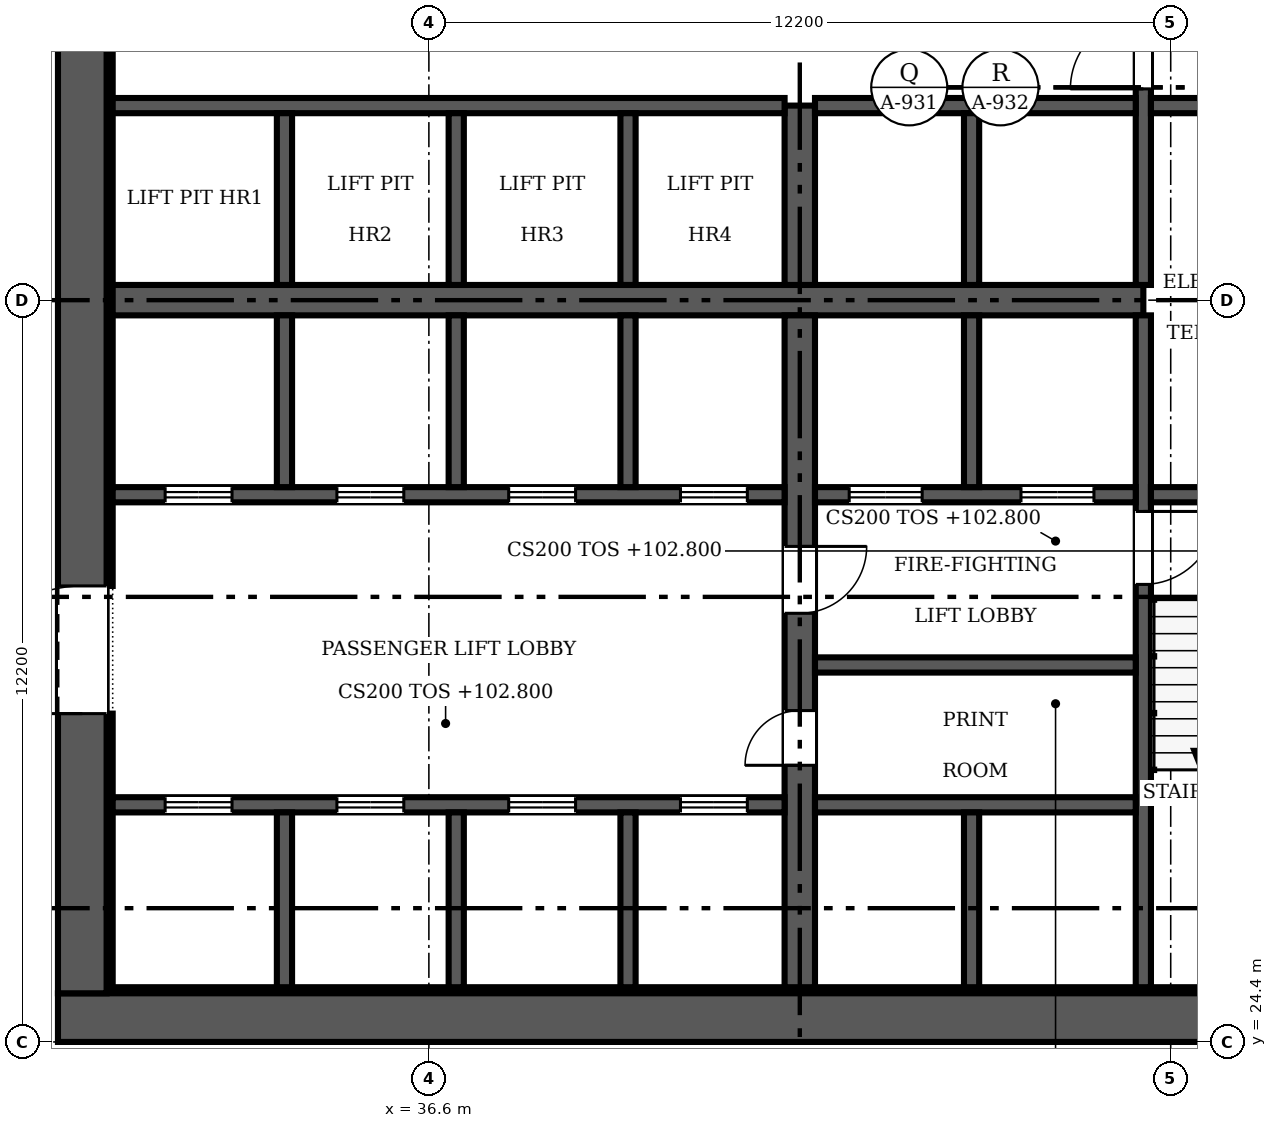
"""IFC4 building model, lengths in metres.
Left out: names, types, materials, properties, quantities, classifications, styles, units other than length and angle.
Written with IfcOpenShell. Run it as: python <this file> out.ifc"""

import sys

from ifc_helpers import new_model, si_unit, direction, frame, frame_2d, origin, place, context, subcontext, project, spatial, rectangle, extrude, source, transform, mapped, element, fill, save


model = new_model("IFC4")
c1 = context("Model", 3, precision=1e-05, world=origin(), true_north=direction((0.0, 1.0)))
c2 = subcontext(c1, "Body", "Model", "MODEL_VIEW")
j1 = project(units=[si_unit("LENGTHUNIT", "METRE"), si_unit("PLANEANGLEUNIT", "RADIAN")], contexts=[c1])
p1 = place(None, origin())
s1 = spatial("IfcSite", under=j1, at=p1, CompositionType="ELEMENT")
p2 = place(p1, origin())
s2 = spatial("IfcBuilding", under=s1, at=p2, CompositionType="ELEMENT")
p3 = place(p2, frame((0.0, 0.0, 102.8)))
s3 = spatial("IfcBuildingStorey", under=s2, at=p3, CompositionType="ELEMENT", Elevation=102.8)
p4 = place(p3, frame((54.9, 24.8, 0.0), z_axis=(0.0, 0.0, 1.0), x_axis=(-1.0, 0.0, 0.0)))
e1 = element("IfcWall", 1, at=p4, inside=s3, PredefinedType="SHEAR", context=c2, shape_type="SweptSolid", body=[
    extrude(rectangle(XDim=24.4, YDim=0.8, at=frame_2d((12.2, 0.0))), origin(), (0.0, 0.0, 1.0), 3.8),
])
m1 = source(origin(), c2, "Body", "SweptSolid", [
    extrude(rectangle(XDim=1.2, YDim=2.1, at=frame_2d((0.6, 1.05))), frame((0.0, 0.41, 0.0), z_axis=(0.0, -1.0, 0.0), x_axis=(1.0, 0.0, 0.0)), (0.0, 0.0, 1.0), 0.82),
])
p5 = place(p4, frame((1.5, 0.0, 0.0)))
e2 = element("IfcOpeningElement", 2, at=p5, cuts=e1, PredefinedType="OPENING", context=c2, shape_type="MappedRepresentation", body=[
    mapped(m1, transform((0.0, 0.0, 0.0), scale=1.0)),
])
p6 = place(p3, frame((30.9, 25.2, 0.0), z_axis=(0.0, 0.0, 1.0), x_axis=(0.0, 1.0, 0.0)))
e3 = element("IfcWall", 3, at=p6, inside=s3, PredefinedType="SHEAR", context=c2, shape_type="SweptSolid", body=[
    extrude(rectangle(XDim=22.8, YDim=0.8, at=frame_2d((11.4, 0.0))), origin(), (0.0, 0.0, 1.0), 3.8),
])
m2 = source(origin(), c2, "Body", "SweptSolid", [
    extrude(rectangle(XDim=2.1, YDim=2.4, at=frame_2d((1.05, 1.2))), frame((0.0, 0.41, 0.0), z_axis=(0.0, -1.0, 0.0), x_axis=(1.0, 0.0, 0.0)), (0.0, 0.0, 1.0), 0.82),
])
p7 = place(p6, frame((4.6, 0.0, 0.0)))
e4 = element("IfcOpeningElement", 4, at=p7, cuts=e3, PredefinedType="OPENING", context=c2, shape_type="MappedRepresentation", body=[
    mapped(m2, transform((0.0, 0.0, 0.0), scale=1.0)),
])
p8 = place(p6, frame((16.1, 0.0, 0.0)))
e5 = element("IfcOpeningElement", 5, at=p8, cuts=e3, PredefinedType="OPENING", context=c2, shape_type="MappedRepresentation", body=[
    mapped(m2, transform((0.0, 0.0, 0.0), scale=1.0)),
])
p9 = place(p3, frame((31.3, 25.25, 0.0), z_axis=(0.0, 0.0, 1.0), x_axis=(1.0, 0.0, 0.0)))
e6 = element("IfcWall", 6, at=p9, inside=s3, PredefinedType="SOLIDWALL", context=c2, shape_type="SweptSolid", body=[
    extrude(rectangle(XDim=20.9, YDim=0.1, at=frame_2d((10.45, 0.0))), origin(), (0.0, 0.0, 1.0), 3.8),
])
p10 = place(p3, frame((31.35, 25.3, 0.0), z_axis=(0.0, 0.0, 1.0), x_axis=(0.0, 1.0, 0.0)))
e7 = element("IfcWall", 7, at=p10, inside=s3, PredefinedType="SOLIDWALL", context=c2, shape_type="SweptSolid", body=[
    extrude(rectangle(XDim=4.5, YDim=0.1, at=frame_2d((2.25, 0.0))), origin(), (0.0, 0.0, 1.0), 3.8),
])
p11 = place(p3, frame((31.35, 31.9, 0.0), z_axis=(0.0, 0.0, 1.0), x_axis=(0.0, 1.0, 0.0)))
e8 = element("IfcWall", 8, at=p11, inside=s3, PredefinedType="SOLIDWALL", context=c2, shape_type="SweptSolid", body=[
    extrude(rectangle(XDim=9.4, YDim=0.1, at=frame_2d((4.7, 0.0))), origin(), (0.0, 0.0, 1.0), 3.8),
])
p12 = place(p3, frame((31.4, 36.6, 0.0), z_axis=(0.0, 0.0, 1.0), x_axis=(1.0, 0.0, 0.0)))
e9 = element("IfcWall", 9, at=p12, inside=s3, PredefinedType="SHEAR", context=c2, shape_type="SweptSolid", body=[
    extrude(rectangle(XDim=16.95, YDim=0.5, at=frame_2d((8.475, 0.0))), origin(), (0.0, 0.0, 1.0), 3.8),
])
p13 = place(p3, frame((42.7, 36.35, 0.0), z_axis=(0.0, 0.0, 1.0), x_axis=(0.0, -1.0, 0.0)))
e10 = element("IfcWall", 10, at=p13, inside=s3, PredefinedType="SHEAR", context=c2, shape_type="SweptSolid", body=[
    extrude(rectangle(XDim=11.05, YDim=0.5, at=frame_2d((5.525, 0.0))), origin(), (0.0, 0.0, 1.0), 3.8),
])
m3 = source(origin(), c2, "Body", "SweptSolid", [
    extrude(rectangle(XDim=0.9, YDim=2.1, at=frame_2d((0.45, 1.05))), frame((0.0, 0.26, 0.0), z_axis=(0.0, -1.0, 0.0), x_axis=(1.0, 0.0, 0.0)), (0.0, 0.0, 1.0), 0.52),
])
p14 = place(p13, frame((6.5, 0.0, 0.0)))
e11 = element("IfcOpeningElement", 11, at=p14, cuts=e10, PredefinedType="OPENING", context=c2, shape_type="MappedRepresentation", body=[
    mapped(m3, transform((0.0, 0.0, 0.0), scale=1.0)),
])
m4 = source(origin(), c2, "Body", "SweptSolid", [
    extrude(rectangle(XDim=1.1, YDim=2.1, at=frame_2d((0.55, 1.05))), frame((0.0, 0.26, 0.0), z_axis=(0.0, -1.0, 0.0), x_axis=(1.0, 0.0, 0.0)), (0.0, 0.0, 1.0), 0.52),
])
p15 = place(p13, frame((3.8, 0.0, 0.0)))
e12 = element("IfcOpeningElement", 12, at=p15, cuts=e10, PredefinedType="OPENING", context=c2, shape_type="MappedRepresentation", body=[
    mapped(m4, transform((0.0, 0.0, 0.0), scale=1.0)),
])
p16 = place(p3, frame((42.7, 36.85, 0.0), z_axis=(0.0, 0.0, 1.0), x_axis=(0.0, 1.0, 0.0)))
e13 = element("IfcWall", 13, at=p16, inside=s3, PredefinedType="SHEAR", context=c2, shape_type="SweptSolid", body=[
    extrude(rectangle(XDim=2.95, YDim=0.5, at=frame_2d((1.475, 0.0))), origin(), (0.0, 0.0, 1.0), 3.8),
])
p17 = place(p3, frame((48.35, 36.35, 0.0), z_axis=(0.0, 0.0, 1.0), x_axis=(0.0, -1.0, 0.0)))
e14 = element("IfcWall", 14, at=p17, inside=s3, PredefinedType="SOLIDWALL", context=c2, shape_type="SweptSolid", body=[
    extrude(rectangle(XDim=11.05, YDim=0.25, at=frame_2d((5.525, 0.0))), origin(), (0.0, 0.0, 1.0), 3.8),
])
m5 = source(origin(), c2, "Body", "SweptSolid", [
    extrude(rectangle(XDim=1.2, YDim=2.1, at=frame_2d((0.6, 1.05))), frame((0.0, 0.135, 0.0), z_axis=(0.0, -1.0, 0.0), x_axis=(1.0, 0.0, 0.0)), (0.0, 0.0, 1.0), 0.27),
])
p18 = place(p17, frame((3.225, 0.0, 0.0)))
e15 = element("IfcOpeningElement", 15, at=p18, cuts=e14, PredefinedType="OPENING", context=c2, shape_type="MappedRepresentation", body=[
    mapped(m5, transform((0.0, 0.0, 0.0), scale=1.0)),
])
p19 = place(p3, frame((48.35, 47.9, 0.0), z_axis=(0.0, 0.0, 1.0), x_axis=(0.0, -1.0, 0.0)))
e16 = element("IfcWall", 16, at=p19, inside=s3, PredefinedType="SOLIDWALL", context=c2, shape_type="SweptSolid", body=[
    extrude(rectangle(XDim=11.05, YDim=0.25, at=frame_2d((5.525, 0.0))), origin(), (0.0, 0.0, 1.0), 3.8),
])
p20 = place(p19, frame((6.625, 0.0, 0.0)))
e17 = element("IfcOpeningElement", 17, at=p20, cuts=e16, PredefinedType="OPENING", context=c2, shape_type="MappedRepresentation", body=[
    mapped(m5, transform((0.0, 0.0, 0.0), scale=1.0)),
])
p21 = place(p3, frame((42.45, 33.4, 0.0), z_axis=(0.0, 0.0, 1.0), x_axis=(-1.0, 0.0, 0.0)))
e18 = element("IfcWall", 18, at=p21, inside=s3, PredefinedType="SOLIDWALL", context=c2, shape_type="SweptSolid", body=[
    extrude(rectangle(XDim=11.05, YDim=0.25, at=frame_2d((5.525, 0.0))), origin(), (0.0, 0.0, 1.0), 3.8),
])
m6 = source(origin(), c2, "Body", "SweptSolid", [
    extrude(rectangle(XDim=1.1, YDim=2.1, at=frame_2d((0.55, 1.05))), frame((0.0, 0.135, 0.0), z_axis=(0.0, -1.0, 0.0), x_axis=(1.0, 0.0, 0.0)), (0.0, 0.0, 1.0), 0.27),
])
p22 = place(p21, frame((9.087, 0.0, 0.0)))
e19 = element("IfcOpeningElement", 19, at=p22, cuts=e18, PredefinedType="OPENING", context=c2, shape_type="MappedRepresentation", body=[
    mapped(m6, transform((0.0, 0.0, 0.0), scale=1.0)),
])
p23 = place(p21, frame((6.262, 0.0, 0.0)))
e20 = element("IfcOpeningElement", 20, at=p23, cuts=e18, PredefinedType="OPENING", context=c2, shape_type="MappedRepresentation", body=[
    mapped(m6, transform((0.0, 0.0, 0.0), scale=1.0)),
])
p24 = place(p21, frame((3.438, 0.0, 0.0)))
e21 = element("IfcOpeningElement", 21, at=p24, cuts=e18, PredefinedType="OPENING", context=c2, shape_type="MappedRepresentation", body=[
    mapped(m6, transform((0.0, 0.0, 0.0), scale=1.0)),
])
p25 = place(p21, frame((0.613, 0.0, 0.0)))
e22 = element("IfcOpeningElement", 22, at=p25, cuts=e18, PredefinedType="OPENING", context=c2, shape_type="MappedRepresentation", body=[
    mapped(m6, transform((0.0, 0.0, 0.0), scale=1.0)),
])
p26 = place(p3, frame((48.225, 33.4, 0.0), z_axis=(0.0, 0.0, 1.0), x_axis=(-1.0, 0.0, 0.0)))
e23 = element("IfcWall", 23, at=p26, inside=s3, PredefinedType="SOLIDWALL", context=c2, shape_type="SweptSolid", body=[
    extrude(rectangle(XDim=5.275, YDim=0.25, at=frame_2d((2.638, 0.0))), origin(), (0.0, 0.0, 1.0), 3.8),
])
p27 = place(p26, frame((3.512, 0.0, 0.0)))
e24 = element("IfcOpeningElement", 24, at=p27, cuts=e23, PredefinedType="OPENING", context=c2, shape_type="MappedRepresentation", body=[
    mapped(m5, transform((0.0, 0.0, 0.0), scale=1.0)),
])
p28 = place(p26, frame((0.688, 0.0, 0.0)))
e25 = element("IfcOpeningElement", 25, at=p28, cuts=e23, PredefinedType="OPENING", context=c2, shape_type="MappedRepresentation", body=[
    mapped(m5, transform((0.0, 0.0, 0.0), scale=1.0)),
])
p29 = place(p3, frame((48.475, 33.4, 0.0), z_axis=(0.0, 0.0, 1.0), x_axis=(1.0, 0.0, 0.0)))
e26 = element("IfcWall", 26, at=p29, inside=s3, PredefinedType="SOLIDWALL", context=c2, shape_type="SweptSolid", body=[
    extrude(rectangle(XDim=3.525, YDim=0.25, at=frame_2d((1.762, 0.0))), origin(), (0.0, 0.0, 1.0), 3.8),
])
p30 = place(p3, frame((31.4, 39.8, 0.0), z_axis=(0.0, 0.0, 1.0), x_axis=(1.0, 0.0, 0.0)))
e27 = element("IfcWall", 27, at=p30, inside=s3, PredefinedType="SOLIDWALL", context=c2, shape_type="SweptSolid", body=[
    extrude(rectangle(XDim=11.05, YDim=0.25, at=frame_2d((5.525, 0.0))), origin(), (0.0, 0.0, 1.0), 3.8),
])
p31 = place(p3, frame((42.95, 39.8, 0.0), z_axis=(0.0, 0.0, 1.0), x_axis=(1.0, 0.0, 0.0)))
e28 = element("IfcWall", 28, at=p31, inside=s3, PredefinedType="SOLIDWALL", context=c2, shape_type="SweptSolid", body=[
    extrude(rectangle(XDim=5.275, YDim=0.25, at=frame_2d((2.638, 0.0))), origin(), (0.0, 0.0, 1.0), 3.8),
])
p32 = place(p3, frame((48.475, 39.8, 0.0), z_axis=(0.0, 0.0, 1.0), x_axis=(1.0, 0.0, 0.0)))
e29 = element("IfcWall", 29, at=p32, inside=s3, PredefinedType="SOLIDWALL", context=c2, shape_type="SweptSolid", body=[
    extrude(rectangle(XDim=3.525, YDim=0.25, at=frame_2d((1.762, 0.0))), origin(), (0.0, 0.0, 1.0), 3.8),
])
p33 = place(p3, frame((31.4, 28.3, 0.0), z_axis=(0.0, 0.0, 1.0), x_axis=(1.0, 0.0, 0.0)))
e30 = element("IfcWall", 30, at=p33, inside=s3, PredefinedType="SOLIDWALL", context=c2, shape_type="SweptSolid", body=[
    extrude(rectangle(XDim=11.05, YDim=0.25, at=frame_2d((5.525, 0.0))), origin(), (0.0, 0.0, 1.0), 3.8),
])
p34 = place(p33, frame((0.863, 0.0, 0.0)))
e31 = element("IfcOpeningElement", 31, at=p34, cuts=e30, PredefinedType="OPENING", context=c2, shape_type="MappedRepresentation", body=[
    mapped(m6, transform((0.0, 0.0, 0.0), scale=1.0)),
])
p35 = place(p33, frame((3.688, 0.0, 0.0)))
e32 = element("IfcOpeningElement", 32, at=p35, cuts=e30, PredefinedType="OPENING", context=c2, shape_type="MappedRepresentation", body=[
    mapped(m6, transform((0.0, 0.0, 0.0), scale=1.0)),
])
p36 = place(p33, frame((6.512, 0.0, 0.0)))
e33 = element("IfcOpeningElement", 33, at=p36, cuts=e30, PredefinedType="OPENING", context=c2, shape_type="MappedRepresentation", body=[
    mapped(m6, transform((0.0, 0.0, 0.0), scale=1.0)),
])
p37 = place(p33, frame((9.337, 0.0, 0.0)))
e34 = element("IfcOpeningElement", 34, at=p37, cuts=e30, PredefinedType="OPENING", context=c2, shape_type="MappedRepresentation", body=[
    mapped(m6, transform((0.0, 0.0, 0.0), scale=1.0)),
])
p38 = place(p3, frame((42.95, 28.3, 0.0), z_axis=(0.0, 0.0, 1.0), x_axis=(1.0, 0.0, 0.0)))
e35 = element("IfcWall", 35, at=p38, inside=s3, PredefinedType="SOLIDWALL", context=c2, shape_type="SweptSolid", body=[
    extrude(rectangle(XDim=5.275, YDim=0.25, at=frame_2d((2.638, 0.0))), origin(), (0.0, 0.0, 1.0), 3.8),
])
p39 = place(p3, frame((34.225, 33.525, 0.0), z_axis=(0.0, 0.0, 1.0), x_axis=(0.0, 1.0, 0.0)))
e36 = element("IfcWall", 36, at=p39, inside=s3, PredefinedType="SOLIDWALL", context=c2, shape_type="SweptSolid", body=[
    extrude(rectangle(XDim=2.825, YDim=0.25, at=frame_2d((1.413, 0.0))), origin(), (0.0, 0.0, 1.0), 3.8),
])
p40 = place(p3, frame((34.225, 36.85, 0.0), z_axis=(0.0, 0.0, 1.0), x_axis=(0.0, 1.0, 0.0)))
e37 = element("IfcWall", 37, at=p40, inside=s3, PredefinedType="SOLIDWALL", context=c2, shape_type="SweptSolid", body=[
    extrude(rectangle(XDim=2.825, YDim=0.25, at=frame_2d((1.413, 0.0))), origin(), (0.0, 0.0, 1.0), 3.8),
])
p41 = place(p3, frame((37.05, 33.525, 0.0), z_axis=(0.0, 0.0, 1.0), x_axis=(0.0, 1.0, 0.0)))
e38 = element("IfcWall", 38, at=p41, inside=s3, PredefinedType="SOLIDWALL", context=c2, shape_type="SweptSolid", body=[
    extrude(rectangle(XDim=2.825, YDim=0.25, at=frame_2d((1.413, 0.0))), origin(), (0.0, 0.0, 1.0), 3.8),
])
p42 = place(p3, frame((37.05, 36.85, 0.0), z_axis=(0.0, 0.0, 1.0), x_axis=(0.0, 1.0, 0.0)))
e39 = element("IfcWall", 39, at=p42, inside=s3, PredefinedType="SOLIDWALL", context=c2, shape_type="SweptSolid", body=[
    extrude(rectangle(XDim=2.825, YDim=0.25, at=frame_2d((1.413, 0.0))), origin(), (0.0, 0.0, 1.0), 3.8),
])
p43 = place(p3, frame((39.875, 33.525, 0.0), z_axis=(0.0, 0.0, 1.0), x_axis=(0.0, 1.0, 0.0)))
e40 = element("IfcWall", 40, at=p43, inside=s3, PredefinedType="SOLIDWALL", context=c2, shape_type="SweptSolid", body=[
    extrude(rectangle(XDim=2.825, YDim=0.25, at=frame_2d((1.413, 0.0))), origin(), (0.0, 0.0, 1.0), 3.8),
])
p44 = place(p3, frame((39.875, 36.85, 0.0), z_axis=(0.0, 0.0, 1.0), x_axis=(0.0, 1.0, 0.0)))
e41 = element("IfcWall", 41, at=p44, inside=s3, PredefinedType="SOLIDWALL", context=c2, shape_type="SweptSolid", body=[
    extrude(rectangle(XDim=2.825, YDim=0.25, at=frame_2d((1.413, 0.0))), origin(), (0.0, 0.0, 1.0), 3.8),
])
p45 = place(p3, frame((45.525, 33.525, 0.0), z_axis=(0.0, 0.0, 1.0), x_axis=(0.0, 1.0, 0.0)))
e42 = element("IfcWall", 42, at=p45, inside=s3, PredefinedType="SOLIDWALL", context=c2, shape_type="SweptSolid", body=[
    extrude(rectangle(XDim=2.825, YDim=0.25, at=frame_2d((1.413, 0.0))), origin(), (0.0, 0.0, 1.0), 3.8),
])
p46 = place(p3, frame((45.525, 36.85, 0.0), z_axis=(0.0, 0.0, 1.0), x_axis=(0.0, 1.0, 0.0)))
e43 = element("IfcWall", 43, at=p46, inside=s3, PredefinedType="SOLIDWALL", context=c2, shape_type="SweptSolid", body=[
    extrude(rectangle(XDim=2.825, YDim=0.25, at=frame_2d((1.413, 0.0))), origin(), (0.0, 0.0, 1.0), 3.8),
])
p47 = place(p3, frame((42.95, 30.6, 0.0), z_axis=(0.0, 0.0, 1.0), x_axis=(1.0, 0.0, 0.0)))
e44 = element("IfcWall", 44, at=p47, inside=s3, PredefinedType="SOLIDWALL", context=c2, shape_type="SweptSolid", body=[
    extrude(rectangle(XDim=5.275, YDim=0.25, at=frame_2d((2.638, 0.0))), origin(), (0.0, 0.0, 1.0), 3.8),
])
for number, where, z_axis, x_axis in (
    (45, (34.225, 25.3, 0.0), (0.0, 0.0, 1.0), (0.0, 1.0, 0.0)),
    (46, (37.05, 25.3, 0.0), (0.0, 0.0, 1.0), (0.0, 1.0, 0.0)),
    (47, (39.875, 25.3, 0.0), (0.0, 0.0, 1.0), (0.0, 1.0, 0.0)),
    (48, (45.525, 25.3, 0.0), (0.0, 0.0, 1.0), (0.0, 1.0, 0.0)),
):
    element("IfcWall", number, at=place(p3, frame(where, z_axis=z_axis, x_axis=x_axis)), inside=s3, PredefinedType="SOLIDWALL", context=c2, shape_type="SweptSolid", body=[
        extrude(rectangle(XDim=2.875, YDim=0.25, at=frame_2d((1.438, 0.0))), origin(), (0.0, 0.0, 1.0), 3.8),
    ])
m7 = source(origin(), c2, "Body", "SweptSolid", [
    extrude(rectangle(XDim=2.1, YDim=2.4, at=frame_2d((1.05, 1.2))), frame((0.0, 0.025, 0.0), z_axis=(0.0, -1.0, 0.0), x_axis=(1.0, 0.0, 0.0)), (0.0, 0.0, 1.0), 0.05),
])
p48 = place(p7, origin())
e49 = element("IfcDoor", 49, at=p48, inside=s3, OperationType="DOUBLE_DOOR_SINGLE_SWING", PredefinedType="DOOR", context=c2, shape_type="MappedRepresentation", body=[
    mapped(m7, transform((0.0, 0.0, 0.0), scale=1.0)),
])
fill(e4, e49)
m8 = source(origin(), c2, "Body", "SweptSolid", [
    extrude(rectangle(XDim=0.9, YDim=2.1, at=frame_2d((0.45, 1.05))), frame((0.0, 0.025, 0.0), z_axis=(0.0, -1.0, 0.0), x_axis=(1.0, 0.0, 0.0)), (0.0, 0.0, 1.0), 0.05),
])
p49 = place(p14, origin())
e50 = element("IfcDoor", 50, at=p49, inside=s3, OperationType="SINGLE_SWING_RIGHT", PredefinedType="DOOR", context=c2, shape_type="MappedRepresentation", body=[
    mapped(m8, transform((0.0, 0.0, 0.0), scale=1.0)),
])
fill(e11, e50)
m9 = source(origin(), c2, "Body", "SweptSolid", [
    extrude(rectangle(XDim=1.1, YDim=2.1, at=frame_2d((0.55, 1.05))), frame((0.0, 0.025, 0.0), z_axis=(0.0, -1.0, 0.0), x_axis=(1.0, 0.0, 0.0)), (0.0, 0.0, 1.0), 0.05),
])
p50 = place(p15, origin())
e51 = element("IfcDoor", 51, at=p50, inside=s3, OperationType="SINGLE_SWING_LEFT", PredefinedType="DOOR", context=c2, shape_type="MappedRepresentation", body=[
    mapped(m9, transform((0.0, 0.0, 0.0), scale=1.0)),
])
fill(e12, e51)
m10 = source(origin(), c2, "Body", "SweptSolid", [
    extrude(rectangle(XDim=1.2, YDim=2.1, at=frame_2d((0.6, 1.05))), frame((0.0, 0.025, 0.0), z_axis=(0.0, -1.0, 0.0), x_axis=(1.0, 0.0, 0.0)), (0.0, 0.0, 1.0), 0.05),
])
p51 = place(p18, origin())
e52 = element("IfcDoor", 52, at=p51, inside=s3, OperationType="SINGLE_SWING_LEFT", PredefinedType="DOOR", context=c2, shape_type="MappedRepresentation", body=[
    mapped(m10, transform((0.0, 0.0, 0.0), scale=1.0)),
])
fill(e15, e52)
p52 = place(p20, origin())
e53 = element("IfcDoor", 53, at=p52, inside=s3, OperationType="SINGLE_SWING_RIGHT", PredefinedType="DOOR", context=c2, shape_type="MappedRepresentation", body=[
    mapped(m10, transform((0.0, 0.0, 0.0), scale=1.0)),
])
fill(e17, e53)
p53 = place(p22, origin())
e54 = element("IfcDoor", 54, at=p53, inside=s3, OperationType="DOUBLE_DOOR_SLIDING", PredefinedType="DOOR", context=c2, shape_type="MappedRepresentation", body=[
    mapped(m9, transform((0.0, 0.0, 0.0), scale=1.0)),
])
fill(e19, e54)
p54 = place(p23, origin())
e55 = element("IfcDoor", 55, at=p54, inside=s3, OperationType="DOUBLE_DOOR_SLIDING", PredefinedType="DOOR", context=c2, shape_type="MappedRepresentation", body=[
    mapped(m9, transform((0.0, 0.0, 0.0), scale=1.0)),
])
fill(e20, e55)
p55 = place(p24, origin())
e56 = element("IfcDoor", 56, at=p55, inside=s3, OperationType="DOUBLE_DOOR_SLIDING", PredefinedType="DOOR", context=c2, shape_type="MappedRepresentation", body=[
    mapped(m9, transform((0.0, 0.0, 0.0), scale=1.0)),
])
fill(e21, e56)
p56 = place(p25, origin())
e57 = element("IfcDoor", 57, at=p56, inside=s3, OperationType="DOUBLE_DOOR_SLIDING", PredefinedType="DOOR", context=c2, shape_type="MappedRepresentation", body=[
    mapped(m9, transform((0.0, 0.0, 0.0), scale=1.0)),
])
fill(e22, e57)
p57 = place(p27, origin())
e58 = element("IfcDoor", 58, at=p57, inside=s3, OperationType="DOUBLE_DOOR_SLIDING", PredefinedType="DOOR", context=c2, shape_type="MappedRepresentation", body=[
    mapped(m10, transform((0.0, 0.0, 0.0), scale=1.0)),
])
fill(e24, e58)
p58 = place(p28, origin())
e59 = element("IfcDoor", 59, at=p58, inside=s3, OperationType="DOUBLE_DOOR_SLIDING", PredefinedType="DOOR", context=c2, shape_type="MappedRepresentation", body=[
    mapped(m10, transform((0.0, 0.0, 0.0), scale=1.0)),
])
fill(e25, e59)
p59 = place(p34, origin())
e60 = element("IfcDoor", 60, at=p59, inside=s3, OperationType="DOUBLE_DOOR_SLIDING", PredefinedType="DOOR", context=c2, shape_type="MappedRepresentation", body=[
    mapped(m9, transform((0.0, 0.0, 0.0), scale=1.0)),
])
fill(e31, e60)
p60 = place(p35, origin())
e61 = element("IfcDoor", 61, at=p60, inside=s3, OperationType="DOUBLE_DOOR_SLIDING", PredefinedType="DOOR", context=c2, shape_type="MappedRepresentation", body=[
    mapped(m9, transform((0.0, 0.0, 0.0), scale=1.0)),
])
fill(e32, e61)
p61 = place(p36, origin())
e62 = element("IfcDoor", 62, at=p61, inside=s3, OperationType="DOUBLE_DOOR_SLIDING", PredefinedType="DOOR", context=c2, shape_type="MappedRepresentation", body=[
    mapped(m9, transform((0.0, 0.0, 0.0), scale=1.0)),
])
fill(e33, e62)
p62 = place(p37, origin())
e63 = element("IfcDoor", 63, at=p62, inside=s3, OperationType="DOUBLE_DOOR_SLIDING", PredefinedType="DOOR", context=c2, shape_type="MappedRepresentation", body=[
    mapped(m9, transform((0.0, 0.0, 0.0), scale=1.0)),
])
fill(e34, e63)
save(model, sys.argv[1])
